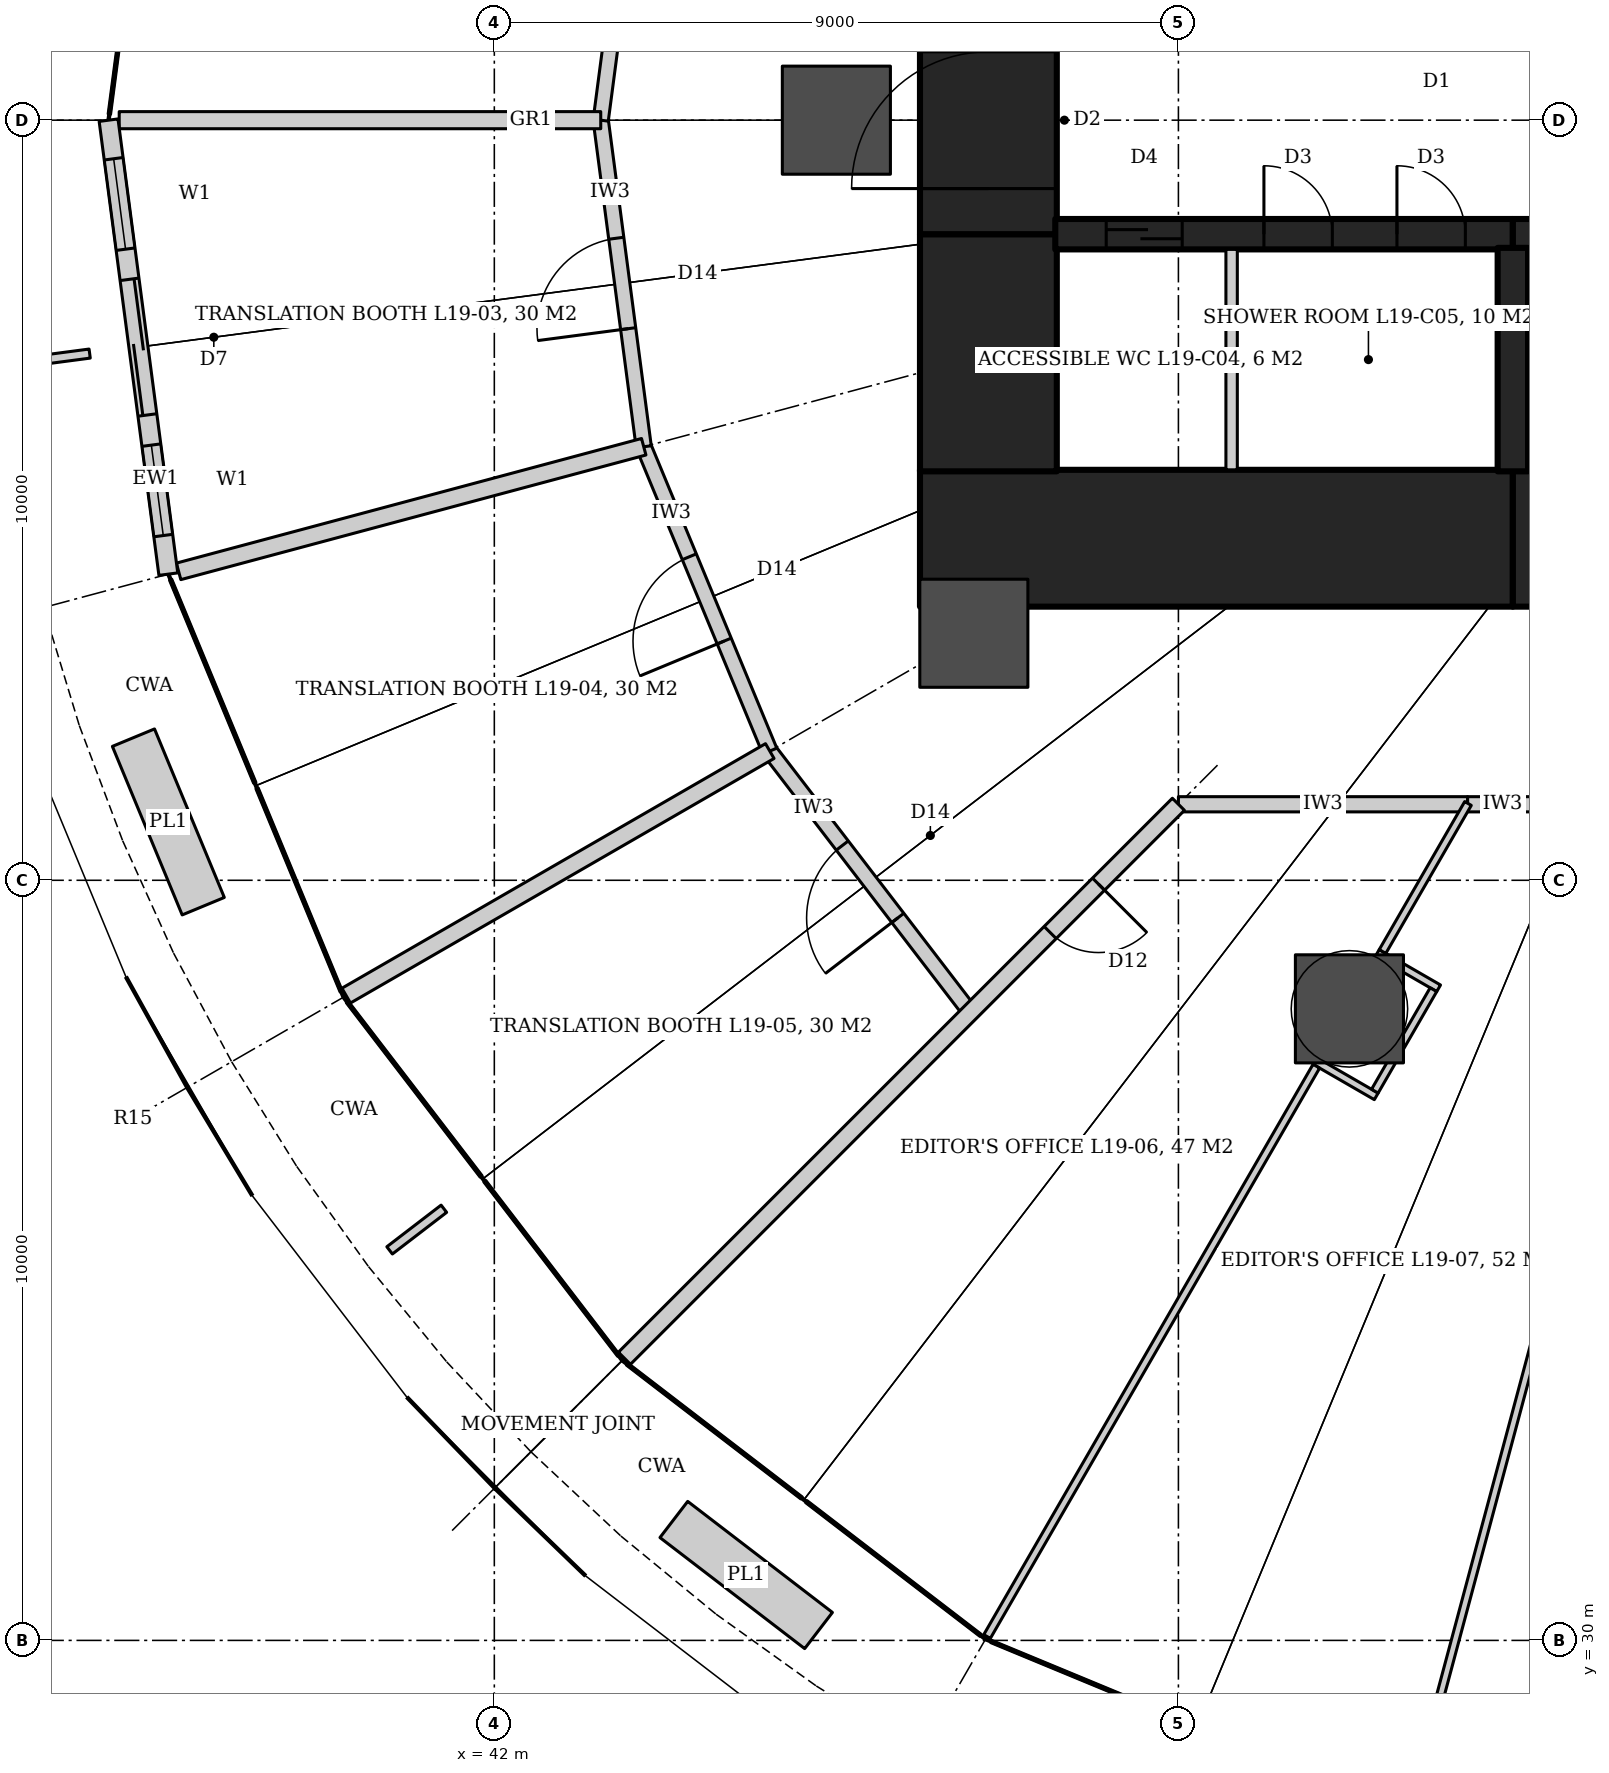
"""IFC4 building model, lengths in metres.
Left out: names, types, materials, properties, quantities, classifications, styles, units other than length and angle.
Written with IfcOpenShell. Run it as: python <this file> out.ifc"""

import sys

from ifc_helpers import new_model, si_unit, direction, frame, frame_2d, origin, origin_2d, place, context, subcontext, project, spatial, rectangle, hollow_circle, extrude, element, fill, save


model = new_model("IFC4")
c1 = context("Model", 3, precision=1e-05, world=origin(), true_north=direction((0.0, 1.0)))
c2 = subcontext(c1, "Body", "Model", "MODEL_VIEW")
j1 = project(units=[si_unit("LENGTHUNIT", "METRE"), si_unit("PLANEANGLEUNIT", "RADIAN")], contexts=[c1])
p1 = place(None, origin())
s1 = spatial("IfcSite", under=j1, at=p1, CompositionType="ELEMENT")
p2 = place(p1, origin())
s2 = spatial("IfcBuilding", under=s1, at=p2, CompositionType="ELEMENT")
p3 = place(p2, frame((0.0, 0.0, 80.6)))
s3 = spatial("IfcBuildingStorey", under=s2, at=p3, CompositionType="ELEMENT", Elevation=80.6)
p4 = place(p3, frame((47.6, 44.5, 0.0), z_axis=(0.0, 0.0, 1.0), x_axis=(1.0, 0.0, 0.0)))
e1 = element("IfcWall", 1, at=p4, inside=s3, PredefinedType="SHEAR", context=c2, shape_type="SweptSolid", body=[
    extrude(rectangle(XDim=7.8, YDim=1.8, at=frame_2d((3.9, 0.0))), origin(), (0.0, 0.0, 1.0), 4.2),
])
p5 = place(p3, frame((55.4, 44.5, 0.0), z_axis=(0.0, 0.0, 1.0), x_axis=(1.0, 0.0, 0.0)))
e2 = element("IfcWall", 2, at=p5, inside=s3, PredefinedType="SHEAR", context=c2, shape_type="SweptSolid", body=[
    extrude(rectangle(XDim=9.2, YDim=1.8, at=frame_2d((4.6, 0.0))), origin(), (0.0, 0.0, 1.0), 4.2),
])
p6 = place(p3, frame((48.5, 45.38, 0.0), z_axis=(0.0, 0.0, 1.0), x_axis=(0.0, 1.0, 0.0)))
e3 = element("IfcWall", 3, at=p6, inside=s3, PredefinedType="SHEAR", context=c2, shape_type="SweptSolid", body=[
    extrude(rectangle(XDim=3.12, YDim=1.8, at=frame_2d((1.56, 0.0))), origin(), (0.0, 0.0, 1.0), 4.2),
])
p7 = place(p3, frame((48.5, 48.5, 0.0), z_axis=(0.0, 0.0, 1.0), x_axis=(0.0, 1.0, 0.0)))
e4 = element("IfcWall", 4, at=p7, inside=s3, PredefinedType="SHEAR", context=c2, shape_type="SweptSolid", body=[
    extrude(rectangle(XDim=3.0, YDim=1.8, at=frame_2d((1.5, 0.0))), origin(), (0.0, 0.0, 1.0), 4.2),
])
p8 = place(p7, frame((0.6, 0.0, 0.0)))
e5 = element("IfcOpeningElement", 5, at=p8, cuts=e4, PredefinedType="OPENING", context=c2, shape_type="SweptSolid", body=[
    extrude(rectangle(XDim=1.8, YDim=2.1, at=frame_2d((0.9, 1.05))), frame((0.0, 0.91, 0.0), z_axis=(0.0, -1.0, 0.0), x_axis=(1.0, 0.0, 0.0)), (0.0, 0.0, 1.0), 1.82),
])
p9 = place(p3, frame((49.38, 48.5, 0.0), z_axis=(0.0, 0.0, 1.0), x_axis=(1.0, 0.0, 0.0)))
e6 = element("IfcWall", 6, at=p9, inside=s3, PredefinedType="SHEAR", context=c2, shape_type="SweptSolid", body=[
    extrude(rectangle(XDim=6.02, YDim=0.4, at=frame_2d((3.01, 0.0))), origin(), (0.0, 0.0, 1.0), 4.2),
])
p10 = place(p9, frame((0.67, 0.0, 0.0)))
e7 = element("IfcOpeningElement", 7, at=p10, cuts=e6, PredefinedType="OPENING", context=c2, shape_type="SweptSolid", body=[
    extrude(rectangle(XDim=1.0, YDim=2.1, at=frame_2d((0.5, 1.05))), frame((0.0, 0.21, 0.0), z_axis=(0.0, -1.0, 0.0), x_axis=(1.0, 0.0, 0.0)), (0.0, 0.0, 1.0), 0.42),
])
p11 = place(p9, frame((2.745, 0.0, 0.0)))
e8 = element("IfcOpeningElement", 8, at=p11, cuts=e6, PredefinedType="OPENING", context=c2, shape_type="SweptSolid", body=[
    extrude(rectangle(XDim=0.9, YDim=2.1, at=frame_2d((0.45, 1.05))), frame((0.0, 0.21, 0.0), z_axis=(0.0, -1.0, 0.0), x_axis=(1.0, 0.0, 0.0)), (0.0, 0.0, 1.0), 0.42),
])
p12 = place(p9, frame((4.495, 0.0, 0.0)))
e9 = element("IfcOpeningElement", 9, at=p12, cuts=e6, PredefinedType="OPENING", context=c2, shape_type="SweptSolid", body=[
    extrude(rectangle(XDim=0.9, YDim=2.1, at=frame_2d((0.45, 1.05))), frame((0.0, 0.21, 0.0), z_axis=(0.0, -1.0, 0.0), x_axis=(1.0, 0.0, 0.0)), (0.0, 0.0, 1.0), 0.42),
])
p13 = place(p3, frame((55.4, 48.5, 0.0), z_axis=(0.0, 0.0, 1.0), x_axis=(1.0, 0.0, 0.0)))
e10 = element("IfcWall", 10, at=p13, inside=s3, PredefinedType="SHEAR", context=c2, shape_type="SweptSolid", body=[
    extrude(rectangle(XDim=9.2, YDim=0.4, at=frame_2d((4.6, 0.0))), origin(), (0.0, 0.0, 1.0), 4.2),
])
p14 = place(p3, frame((55.4, 48.32, 0.0), z_axis=(0.0, 0.0, 1.0), x_axis=(0.0, -1.0, 0.0)))
e11 = element("IfcWall", 11, at=p14, inside=s3, PredefinedType="SHEAR", context=c2, shape_type="SweptSolid", body=[
    extrude(rectangle(XDim=2.94, YDim=0.4, at=frame_2d((1.47, 0.0))), origin(), (0.0, 0.0, 1.0), 4.2),
])
for number, where, z_axis, x_axis in (
    (12, (46.5, 50.0, 0.0), (0.0, 0.0, 1.0), (1.0, 0.0, 0.0)),
    (13, (48.309, 43.25, 0.0), (0.0, 0.0, 1.0), (1.0, 0.0, 0.0)),
    (14, (53.25, 38.309, 0.0), (0.0, 0.0, 1.0), (1.0, 0.0, 0.0)),
):
    element("IfcColumn", number, at=place(p3, frame(where, z_axis=z_axis, x_axis=x_axis)), inside=s3, PredefinedType="COLUMN", context=c2, shape_type="SweptSolid", body=[
        extrude(hollow_circle(Radius=0.711, WallThickness=0.07, at=origin_2d()), origin(), (0.0, 0.0, 1.0), 4.2),
    ])
p15 = place(p3, frame((48.262, 38.262, 0.0), z_axis=(0.0, 0.0, 1.0), x_axis=(-0.60874374674, 0.79336690806, 0.0)))
e15 = element("IfcWall", 15, at=p15, inside=s3, PredefinedType="PARTITIONING", context=c2, shape_type="SweptSolid", body=[
    extrude(rectangle(XDim=4.333, YDim=0.2, at=frame_2d((2.167, 0.0))), origin(), (0.0, 0.0, 1.0), 3.04),
])
p16 = place(p15, frame((1.567, 0.0, 0.0)))
e16 = element("IfcOpeningElement", 16, at=p16, cuts=e15, PredefinedType="OPENING", context=c2, shape_type="SweptSolid", body=[
    extrude(rectangle(XDim=1.2, YDim=2.4, at=frame_2d((0.6, 1.2))), frame((0.0, 0.11, 0.0), z_axis=(0.0, -1.0, 0.0), x_axis=(1.0, 0.0, 0.0)), (0.0, 0.0, 1.0), 0.22),
])
p17 = place(p3, frame((45.624, 41.7, 0.0), z_axis=(0.0, 0.0, 1.0), x_axis=(-0.382698425325, 0.923873322082, 0.0)))
e17 = element("IfcWall", 17, at=p17, inside=s3, PredefinedType="PARTITIONING", context=c2, shape_type="SweptSolid", body=[
    extrude(rectangle(XDim=4.333, YDim=0.2, at=frame_2d((2.167, 0.0))), origin(), (0.0, 0.0, 1.0), 3.04),
])
p18 = place(p17, frame((1.567, 0.0, 0.0)))
e18 = element("IfcOpeningElement", 18, at=p18, cuts=e17, PredefinedType="OPENING", context=c2, shape_type="SweptSolid", body=[
    extrude(rectangle(XDim=1.2, YDim=2.4, at=frame_2d((0.6, 1.2))), frame((0.0, 0.11, 0.0), z_axis=(0.0, -1.0, 0.0), x_axis=(1.0, 0.0, 0.0)), (0.0, 0.0, 1.0), 0.22),
])
p19 = place(p3, frame((43.966, 45.704, 0.0), z_axis=(0.0, 0.0, 1.0), x_axis=(-0.130536124221, 0.99144355375, 0.0)))
e19 = element("IfcWall", 19, at=p19, inside=s3, PredefinedType="PARTITIONING", context=c2, shape_type="SweptSolid", body=[
    extrude(rectangle(XDim=4.333, YDim=0.2, at=frame_2d((2.167, 0.0))), origin(), (0.0, 0.0, 1.0), 3.04),
])
p20 = place(p19, frame((1.567, 0.0, 0.0)))
e20 = element("IfcOpeningElement", 20, at=p20, cuts=e19, PredefinedType="OPENING", context=c2, shape_type="SweptSolid", body=[
    extrude(rectangle(XDim=1.2, YDim=2.4, at=frame_2d((0.6, 1.2))), frame((0.0, 0.11, 0.0), z_axis=(0.0, -1.0, 0.0), x_axis=(1.0, 0.0, 0.0)), (0.0, 0.0, 1.0), 0.22),
])
p21 = place(p3, frame((43.4, 50.0, 0.0), z_axis=(0.0, 0.0, 1.0), x_axis=(0.130536124221, 0.99144355375, 0.0)))
e21 = element("IfcWall", 21, at=p21, inside=s3, PredefinedType="PARTITIONING", context=c2, shape_type="SweptSolid", body=[
    extrude(rectangle(XDim=4.333, YDim=0.2, at=frame_2d((2.167, 0.0))), origin(), (0.0, 0.0, 1.0), 3.04),
])
p22 = place(p3, frame((57.588, 41.0, 0.0), z_axis=(0.0, 0.0, 1.0), x_axis=(-1.0, 0.0, 0.0)))
e22 = element("IfcWall", 22, at=p22, inside=s3, PredefinedType="PARTITIONING", context=c2, shape_type="SweptSolid", body=[
    extrude(rectangle(XDim=2.785, YDim=0.2, at=frame_2d((1.392, 0.0))), origin(), (0.0, 0.0, 1.0), 3.04),
])
p23 = place(p22, frame((0.942, 0.0, 0.0)))
e23 = element("IfcOpeningElement", 23, at=p23, cuts=e22, PredefinedType="OPENING", context=c2, shape_type="SweptSolid", body=[
    extrude(rectangle(XDim=0.9, YDim=2.4, at=frame_2d((0.45, 1.2))), frame((0.0, 0.11, 0.0), z_axis=(0.0, -1.0, 0.0), x_axis=(1.0, 0.0, 0.0)), (0.0, 0.0, 1.0), 0.22),
])
p24 = place(p3, frame((54.804, 41.0, 0.0), z_axis=(0.0, 0.0, 1.0), x_axis=(-1.0, 0.0, 0.0)))
e24 = element("IfcWall", 24, at=p24, inside=s3, PredefinedType="PARTITIONING", context=c2, shape_type="SweptSolid", body=[
    extrude(rectangle(XDim=3.804, YDim=0.2, at=frame_2d((1.902, 0.0))), origin(), (0.0, 0.0, 1.0), 3.02),
])
p25 = place(p3, frame((43.4, 50.0, 0.0), z_axis=(0.0, 0.0, 1.0), x_axis=(-1.0, 0.0, 0.0)))
e25 = element("IfcWall", 25, at=p25, inside=s3, PredefinedType="PARTITIONING", context=c2, shape_type="SweptSolid", body=[
    extrude(rectangle(XDim=6.36, YDim=0.225, at=frame_2d((3.18, 0.0))), origin(), (0.0, 0.0, 1.0), 3.04),
])
p26 = place(p3, frame((43.966, 45.704, 0.0), z_axis=(0.0, 0.0, 1.0), x_axis=(-0.965929717932, -0.258804520856, 0.0)))
e26 = element("IfcWall", 26, at=p26, inside=s3, PredefinedType="PARTITIONING", context=c2, shape_type="SweptSolid", body=[
    extrude(rectangle(XDim=6.36, YDim=0.225, at=frame_2d((3.18, 0.0))), origin(), (0.0, 0.0, 1.0), 3.04),
])
p27 = place(p3, frame((45.624, 41.7, 0.0), z_axis=(0.0, 0.0, 1.0), x_axis=(-0.866025099701, -0.500000526688, 0.0)))
e27 = element("IfcWall", 27, at=p27, inside=s3, PredefinedType="PARTITIONING", context=c2, shape_type="SweptSolid", body=[
    extrude(rectangle(XDim=6.46, YDim=0.225, at=frame_2d((3.23, 0.0))), origin(), (0.0, 0.0, 1.0), 3.04),
])
p28 = place(p3, frame((51.0, 41.0, 0.0), z_axis=(0.0, 0.0, 1.0), x_axis=(-0.707106781187, -0.707106781187, 0.0)))
e28 = element("IfcWall", 28, at=p28, inside=s3, PredefinedType="PARTITIONING", context=c2, shape_type="SweptSolid", body=[
    extrude(rectangle(XDim=10.332, YDim=0.225, at=frame_2d((5.166, 0.0))), origin(), (0.0, 0.0, 1.0), 3.02),
])
p29 = place(p28, frame((1.486, 0.0, 0.0)))
e29 = element("IfcOpeningElement", 29, at=p29, cuts=e28, PredefinedType="OPENING", context=c2, shape_type="SweptSolid", body=[
    extrude(rectangle(XDim=0.9, YDim=2.4, at=frame_2d((0.45, 1.2))), frame((0.0, 0.123, 0.0), z_axis=(0.0, -1.0, 0.0), x_axis=(1.0, 0.0, 0.0)), (0.0, 0.0, 1.0), 0.245),
])
for number, where, z_axis, x_axis in (
    (30, (53.617, 39.045, 0.0), (0.0, 0.0, 1.0), (0.866, -0.5, 0.0)),
    (31, (52.796, 37.623, 0.0), (0.0, 0.0, 1.0), (0.866, -0.5, 0.0)),
):
    element("IfcWall", number, at=place(p3, frame(where, z_axis=z_axis, x_axis=x_axis)), inside=s3, PredefinedType="PARTITIONING", context=c2, shape_type="SweptSolid", body=[
        extrude(rectangle(XDim=0.931, YDim=0.1, at=frame_2d((0.466, 0.0))), origin(), (0.0, 0.0, 1.0), 3.02),
    ])
p30 = place(p3, frame((54.355, 38.561, 0.0), z_axis=(0.0, 0.0, 1.0), x_axis=(-0.50005597947, -0.86599308161, 0.0)))
e32 = element("IfcWall", 32, at=p30, inside=s3, PredefinedType="PARTITIONING", context=c2, shape_type="SweptSolid", body=[
    extrude(rectangle(XDim=1.542, YDim=0.1, at=frame_2d((0.771, 0.0))), origin(), (0.0, 0.0, 1.0), 3.02),
])
p31 = place(p3, frame((54.81, 41.011, 0.0), z_axis=(0.0, 0.0, 1.0), x_axis=(-0.499991822116, -0.866030125237, 0.0)))
e33 = element("IfcWall", 33, at=p31, inside=s3, PredefinedType="PARTITIONING", context=c2, shape_type="SweptSolid", body=[
    extrude(rectangle(XDim=2.249, YDim=0.1, at=frame_2d((1.125, 0.0))), origin(), (0.0, 0.0, 1.0), 3.04),
])
p32 = place(p3, frame((52.814, 37.554, 0.0), z_axis=(0.0, 0.0, 1.0), x_axis=(-0.500010270335, -0.866019474122, 0.0)))
e34 = element("IfcWall", 34, at=p32, inside=s3, PredefinedType="PARTITIONING", context=c2, shape_type="SweptSolid", body=[
    extrude(rectangle(XDim=8.689, YDim=0.1, at=frame_2d((4.344, 0.0))), origin(), (0.0, 0.0, 1.0), 3.04),
])
p33 = place(p3, frame((57.588, 40.998, 0.0), z_axis=(0.0, 0.0, 1.0), x_axis=(-0.258835854707, -0.965921322012, 0.0)))
e35 = element("IfcWall", 35, at=p33, inside=s3, PredefinedType="PARTITIONING", context=c2, shape_type="SweptSolid", body=[
    extrude(rectangle(XDim=13.74, YDim=0.1, at=frame_2d((6.87, 0.0))), origin(), (0.0, 0.0, 1.0), 3.02),
])
p34 = place(p3, frame((36.9, 50.0, 0.0), z_axis=(0.0, 0.0, 1.0), x_axis=(0.130524679454, -0.991445060532, 0.0)))
e36 = element("IfcWall", 36, at=p34, inside=s3, PredefinedType="SOLIDWALL", context=c2, shape_type="SweptSolid", body=[
    extrude(rectangle(XDim=6.03, YDim=0.25, at=frame_2d((3.015, 0.0))), origin(), (0.0, 0.0, 1.0), 4.04),
])
p35 = place(p34, frame((2.115, 0.0, 0.0)))
e37 = element("IfcOpeningElement", 37, at=p35, cuts=e36, PredefinedType="OPENING", context=c2, shape_type="SweptSolid", body=[
    extrude(rectangle(XDim=1.8, YDim=2.4, at=frame_2d((0.9, 1.2))), frame((0.0, 0.135, 0.0), z_axis=(0.0, -1.0, 0.0), x_axis=(1.0, 0.0, 0.0)), (0.0, 0.0, 1.0), 0.27),
])
p36 = place(p34, frame((0.515, 0.0, 0.0)))
e38 = element("IfcOpeningElement", 38, at=p36, cuts=e36, PredefinedType="OPENING", context=c2, shape_type="SweptSolid", body=[
    extrude(rectangle(XDim=1.2, YDim=2.4, at=frame_2d((0.6, 1.2))), frame((0.0, 0.135, 0.0), z_axis=(0.0, -1.0, 0.0), x_axis=(1.0, 0.0, 0.0)), (0.0, 0.0, 1.0), 0.27),
])
p37 = place(p34, frame((4.315, 0.0, 0.0)))
e39 = element("IfcOpeningElement", 39, at=p37, cuts=e36, PredefinedType="OPENING", context=c2, shape_type="SweptSolid", body=[
    extrude(rectangle(XDim=1.2, YDim=2.4, at=frame_2d((0.6, 1.2))), frame((0.0, 0.135, 0.0), z_axis=(0.0, -1.0, 0.0), x_axis=(1.0, 0.0, 0.0)), (0.0, 0.0, 1.0), 0.27),
])
p38 = place(p3, frame((51.7, 45.4, 0.0), z_axis=(0.0, 0.0, 1.0), x_axis=(0.0, 1.0, 0.0)))
e40 = element("IfcWall", 40, at=p38, inside=s3, PredefinedType="PARTITIONING", context=c2, shape_type="SweptSolid", body=[
    extrude(rectangle(XDim=2.9, YDim=0.15, at=frame_2d((1.45, 0.0))), origin(), (0.0, 0.0, 1.0), 4.04),
])
p39 = place(p20, origin())
e41 = element("IfcDoor", 41, at=p39, inside=s3, OperationType="SINGLE_SWING_LEFT", PredefinedType="DOOR", context=c2, shape_type="SweptSolid", body=[
    extrude(rectangle(XDim=1.2, YDim=2.4, at=frame_2d((0.6, 1.2))), frame((0.0, 0.025, 0.0), z_axis=(0.0, -1.0, 0.0), x_axis=(1.0, 0.0, 0.0)), (0.0, 0.0, 1.0), 0.05),
])
fill(e20, e41)
p40 = place(p18, origin())
e42 = element("IfcDoor", 42, at=p40, inside=s3, OperationType="SINGLE_SWING_LEFT", PredefinedType="DOOR", context=c2, shape_type="SweptSolid", body=[
    extrude(rectangle(XDim=1.2, YDim=2.4, at=frame_2d((0.6, 1.2))), frame((0.0, 0.025, 0.0), z_axis=(0.0, -1.0, 0.0), x_axis=(1.0, 0.0, 0.0)), (0.0, 0.0, 1.0), 0.05),
])
fill(e18, e42)
p41 = place(p16, origin())
e43 = element("IfcDoor", 43, at=p41, inside=s3, OperationType="SINGLE_SWING_LEFT", PredefinedType="DOOR", context=c2, shape_type="SweptSolid", body=[
    extrude(rectangle(XDim=1.2, YDim=2.4, at=frame_2d((0.6, 1.2))), frame((0.0, 0.025, 0.0), z_axis=(0.0, -1.0, 0.0), x_axis=(1.0, 0.0, 0.0)), (0.0, 0.0, 1.0), 0.05),
])
fill(e16, e43)
p42 = place(p29, origin())
e44 = element("IfcDoor", 44, at=p42, inside=s3, OperationType="SINGLE_SWING_LEFT", PredefinedType="DOOR", context=c2, shape_type="SweptSolid", body=[
    extrude(rectangle(XDim=0.9, YDim=2.4, at=frame_2d((0.45, 1.2))), frame((0.0, 0.025, 0.0), z_axis=(0.0, -1.0, 0.0), x_axis=(1.0, 0.0, 0.0)), (0.0, 0.0, 1.0), 0.05),
])
fill(e29, e44)
p43 = place(p35, origin())
e45 = element("IfcDoor", 45, at=p43, inside=s3, OperationType="DOUBLE_DOOR_SLIDING", PredefinedType="DOOR", context=c2, shape_type="SweptSolid", body=[
    extrude(rectangle(XDim=1.8, YDim=2.4, at=frame_2d((0.9, 1.2))), frame((0.0, 0.025, 0.0), z_axis=(0.0, -1.0, 0.0), x_axis=(1.0, 0.0, 0.0)), (0.0, 0.0, 1.0), 0.05),
])
fill(e37, e45)
p44 = place(p36, origin())
e46 = element("IfcWindow", 46, at=p44, inside=s3, PartitioningType="SINGLE_PANEL", PredefinedType="WINDOW", context=c2, shape_type="SweptSolid", body=[
    extrude(rectangle(XDim=1.2, YDim=2.4, at=frame_2d((0.6, 1.2))), frame((0.0, 0.03, 0.0), z_axis=(0.0, -1.0, 0.0), x_axis=(1.0, 0.0, 0.0)), (0.0, 0.0, 1.0), 0.06),
])
fill(e38, e46)
p45 = place(p37, origin())
e47 = element("IfcWindow", 47, at=p45, inside=s3, PartitioningType="SINGLE_PANEL", PredefinedType="WINDOW", context=c2, shape_type="SweptSolid", body=[
    extrude(rectangle(XDim=1.2, YDim=2.4, at=frame_2d((0.6, 1.2))), frame((0.0, 0.03, 0.0), z_axis=(0.0, -1.0, 0.0), x_axis=(1.0, 0.0, 0.0)), (0.0, 0.0, 1.0), 0.06),
])
fill(e39, e47)
p46 = place(p10, origin())
e48 = element("IfcDoor", 48, at=p46, inside=s3, OperationType="SLIDING_TO_LEFT", PredefinedType="DOOR", context=c2, shape_type="SweptSolid", body=[
    extrude(rectangle(XDim=1.0, YDim=2.1, at=frame_2d((0.5, 1.05))), frame((0.0, 0.025, 0.0), z_axis=(0.0, -1.0, 0.0), x_axis=(1.0, 0.0, 0.0)), (0.0, 0.0, 1.0), 0.05),
])
fill(e7, e48)
p47 = place(p11, origin())
e49 = element("IfcDoor", 49, at=p47, inside=s3, OperationType="SINGLE_SWING_RIGHT", PredefinedType="DOOR", context=c2, shape_type="SweptSolid", body=[
    extrude(rectangle(XDim=0.9, YDim=2.1, at=frame_2d((0.45, 1.05))), frame((0.0, 0.025, 0.0), z_axis=(0.0, -1.0, 0.0), x_axis=(1.0, 0.0, 0.0)), (0.0, 0.0, 1.0), 0.05),
])
fill(e8, e49)
p48 = place(p12, origin())
e50 = element("IfcDoor", 50, at=p48, inside=s3, OperationType="SINGLE_SWING_RIGHT", PredefinedType="DOOR", context=c2, shape_type="SweptSolid", body=[
    extrude(rectangle(XDim=0.9, YDim=2.1, at=frame_2d((0.45, 1.05))), frame((0.0, 0.025, 0.0), z_axis=(0.0, -1.0, 0.0), x_axis=(1.0, 0.0, 0.0)), (0.0, 0.0, 1.0), 0.05),
])
fill(e9, e50)
p49 = place(p8, origin())
e51 = element("IfcDoor", 51, at=p49, inside=s3, OperationType="DOUBLE_DOOR_DOUBLE_SWING", PredefinedType="DOOR", context=c2, shape_type="SweptSolid", body=[
    extrude(rectangle(XDim=1.8, YDim=2.1, at=frame_2d((0.9, 1.05))), frame((0.0, 0.025, 0.0), z_axis=(0.0, -1.0, 0.0), x_axis=(1.0, 0.0, 0.0)), (0.0, 0.0, 1.0), 0.05),
])
fill(e5, e51)
save(model, sys.argv[1])
